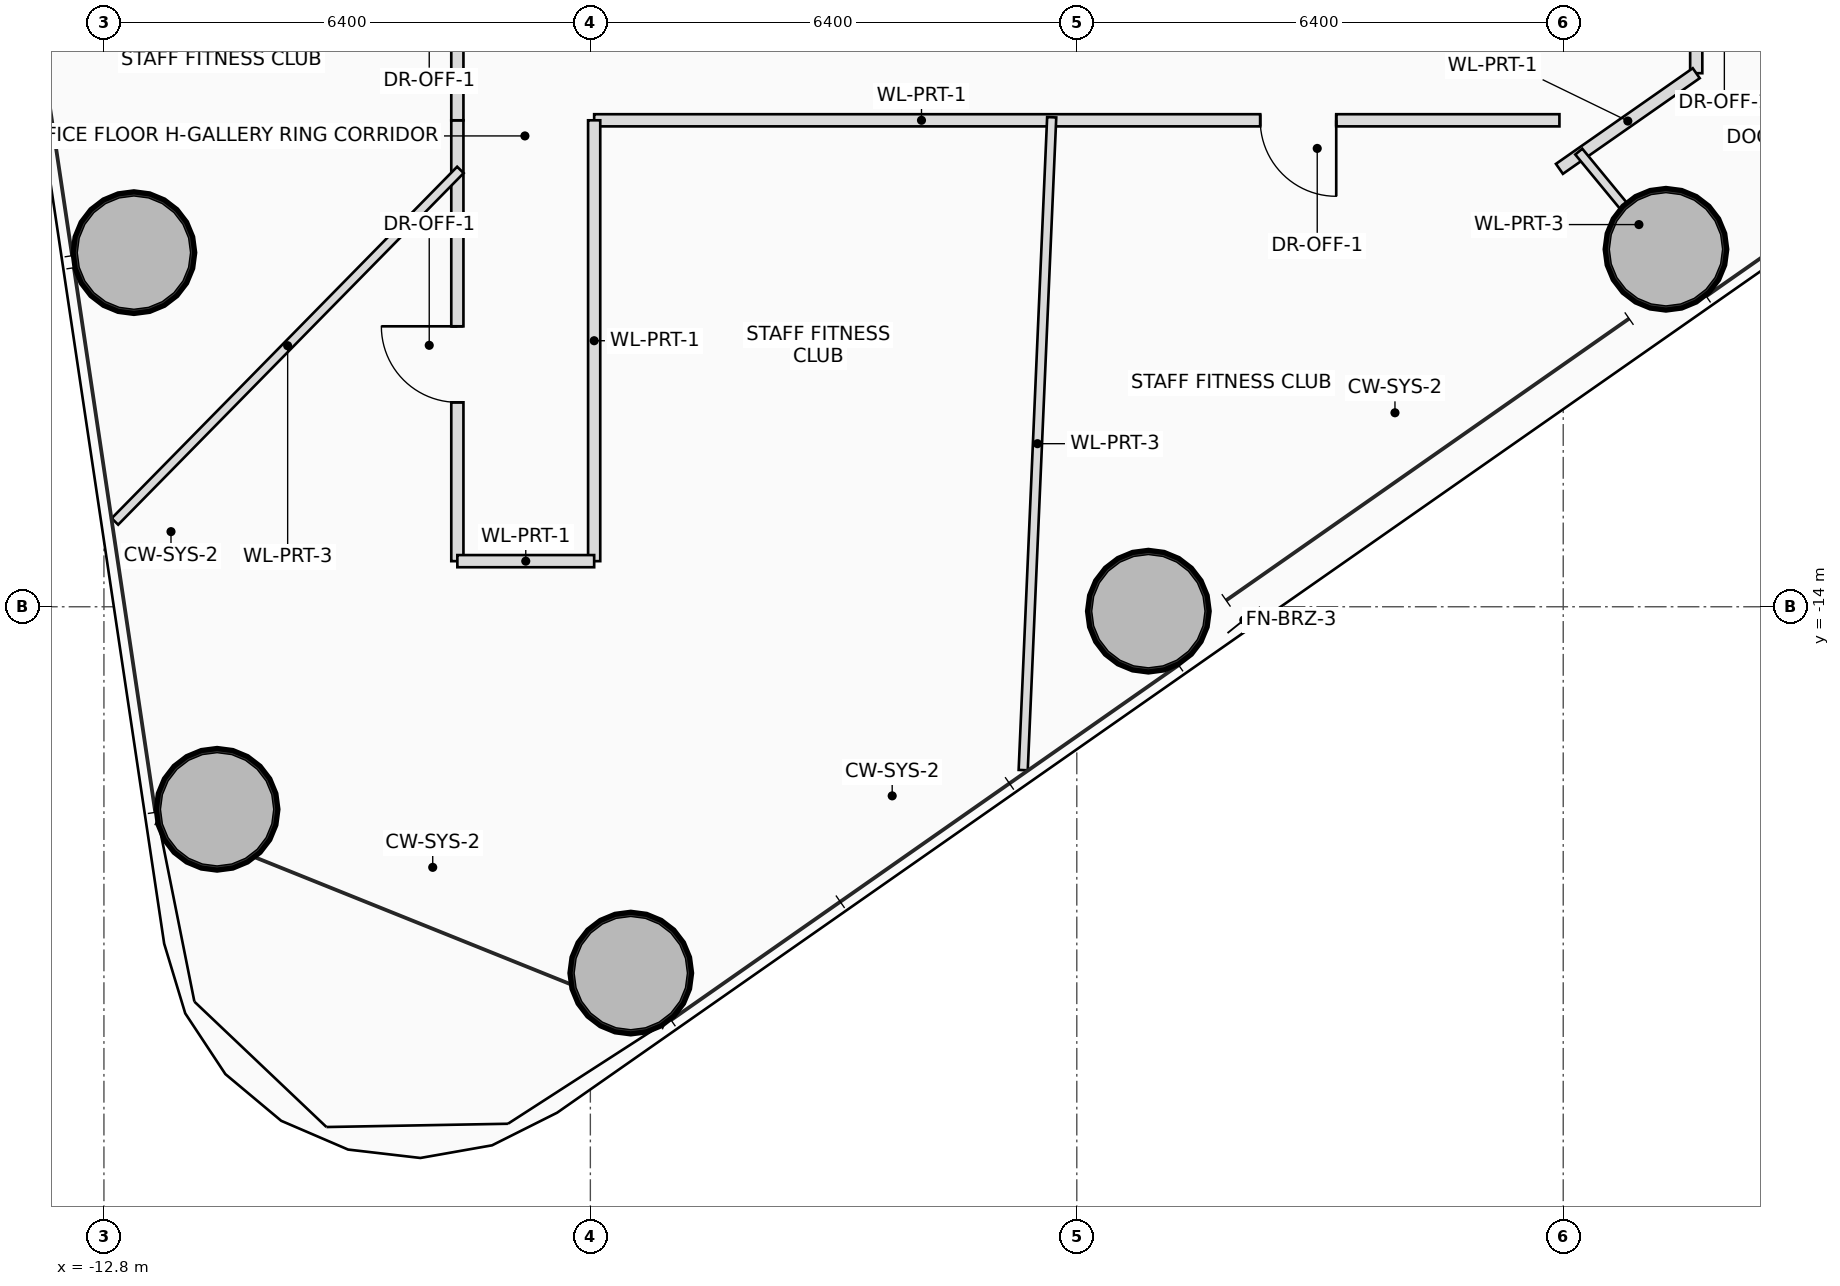
"""IFC4 building model, lengths in metres.
Left out: names, types, materials, properties, quantities, classifications, styles, units other than length and angle.
Written with IfcOpenShell. Run it as: python <this file> out.ifc"""

import sys

from ifc_helpers import new_model, si_unit, direction, frame, frame_2d, origin, origin_2d, place, context, subcontext, project, spatial, rectangle, hollow_circle, extrude, source, transform, mapped, element, fill, save


model = new_model("IFC4")
c1 = context("Model", 3, precision=1e-05, world=origin(), true_north=direction((0.0, 1.0)))
c2 = subcontext(c1, "Body", "Model", "MODEL_VIEW")
j1 = project(units=[si_unit("LENGTHUNIT", "METRE"), si_unit("PLANEANGLEUNIT", "RADIAN")], contexts=[c1])
p1 = place(None, origin())
s1 = spatial("IfcSite", under=j1, at=p1, CompositionType="ELEMENT")
p2 = place(p1, origin())
s2 = spatial("IfcBuilding", under=s1, at=p2, CompositionType="ELEMENT")
p3 = place(p2, frame((0.0, 0.0, 81.05)))
s3 = spatial("IfcBuildingStorey", under=s2, at=p3, CompositionType="ELEMENT", Elevation=81.05)
m1 = source(origin(), c2, "Body", "SweptSolid", [
    extrude(hollow_circle(Radius=0.8, WallThickness=0.055, at=origin_2d()), origin(), (0.0, 0.0, 1.0), 3.75),
])
for number, where, z_axis, x_axis in (
    (1, (-5.868, -18.819, 0.0), (0.0, 0.0, 1.0), (1.0, 0.0, 0.0)),
    (2, (0.942, -14.058, 0.0), (0.0, 0.0, 1.0), (1.0, 0.0, 0.0)),
    (3, (7.752, -9.297, 0.0), (0.0, 0.0, 1.0), (1.0, 0.0, 0.0)),
    (4, (-12.406, -9.341, 0.0), (0.0, 0.0, 1.0), (1.0, 0.0, 0.0)),
    (5, (-11.311, -16.665, 0.0), (0.0, 0.0, 1.0), (1.0, 0.0, 0.0)),
):
    element("IfcColumn", number, at=place(p3, frame(where, z_axis=z_axis, x_axis=x_axis)), inside=s3, PredefinedType="COLUMN", context=c2, shape_type="MappedRepresentation", body=[
        mapped(m1, transform((0.0, 0.0, 0.0), scale=1.0)),
    ])
p4 = place(p3, frame((-8.15, -13.4, 0.0), z_axis=(0.0, 0.0, 1.0), x_axis=(0.0, 1.0, 0.0)))
e6 = element("IfcWall", 6, at=p4, inside=s3, PredefinedType="PARTITIONING", context=c2, shape_type="SweptSolid", body=[
    extrude(rectangle(XDim=5.8, YDim=0.16, at=frame_2d((2.9, 0.0))), origin(), (0.0, 0.0, 1.0), 2.815),
])
p5 = place(p4, frame((2.09, 0.0, 0.0)))
e7 = element("IfcOpeningElement", 7, at=p5, cuts=e6, PredefinedType="OPENING", context=c2, shape_type="SweptSolid", body=[
    extrude(rectangle(XDim=1.0, YDim=2.25, at=frame_2d((0.5, 1.125))), frame((0.0, 0.09, 0.0), z_axis=(0.0, -1.0, 0.0), x_axis=(1.0, 0.0, 0.0)), (0.0, 0.0, 1.0), 0.18),
])
p6 = place(p3, frame((-8.15, -7.6, 0.0), z_axis=(0.0, 0.0, 1.0), x_axis=(0.0, 1.0, 0.0)))
e8 = element("IfcWall", 8, at=p6, inside=s3, PredefinedType="PARTITIONING", context=c2, shape_type="SweptSolid", body=[
    extrude(rectangle(XDim=15.2, YDim=0.16, at=frame_2d((7.6, 0.0))), origin(), (0.0, 0.0, 1.0), 2.815),
])
p7 = place(p6, frame((1.853, 0.0, 0.0)))
e9 = element("IfcOpeningElement", 9, at=p7, cuts=e8, PredefinedType="OPENING", context=c2, shape_type="SweptSolid", body=[
    extrude(rectangle(XDim=1.0, YDim=2.25, at=frame_2d((0.5, 1.125))), frame((0.0, 0.09, 0.0), z_axis=(0.0, -1.0, 0.0), x_axis=(1.0, 0.0, 0.0)), (0.0, 0.0, 1.0), 0.18),
])
p8 = place(p6, frame((7.613, 0.0, 0.0)))
e10 = element("IfcOpeningElement", 10, at=p8, cuts=e8, PredefinedType="OPENING", context=c2, shape_type="SweptSolid", body=[
    extrude(rectangle(XDim=1.0, YDim=2.25, at=frame_2d((0.5, 1.125))), frame((0.0, 0.09, 0.0), z_axis=(0.0, -1.0, 0.0), x_axis=(1.0, 0.0, 0.0)), (0.0, 0.0, 1.0), 0.18),
])
p9 = place(p6, frame((12.862, 0.0, 0.0)))
e11 = element("IfcOpeningElement", 11, at=p9, cuts=e8, PredefinedType="OPENING", context=c2, shape_type="SweptSolid", body=[
    extrude(rectangle(XDim=1.0, YDim=2.25, at=frame_2d((0.5, 1.125))), frame((0.0, 0.09, 0.0), z_axis=(0.0, -1.0, 0.0), x_axis=(1.0, 0.0, 0.0)), (0.0, 0.0, 1.0), 0.18),
])
p10 = place(p3, frame((8.15, -0.02, 0.0), z_axis=(0.0, 0.0, 1.0), x_axis=(0.0, -1.0, 0.0)))
e12 = element("IfcWall", 12, at=p10, inside=s3, PredefinedType="PARTITIONING", context=c2, shape_type="SweptSolid", body=[
    extrude(rectangle(XDim=6.96, YDim=0.16, at=frame_2d((3.48, 0.0))), origin(), (0.0, 0.0, 1.0), 2.815),
])
p11 = place(p10, frame((5.023, 0.0, 0.0)))
e13 = element("IfcOpeningElement", 13, at=p11, cuts=e12, PredefinedType="OPENING", context=c2, shape_type="SweptSolid", body=[
    extrude(rectangle(XDim=1.0, YDim=2.25, at=frame_2d((0.5, 1.125))), frame((0.0, 0.09, 0.0), z_axis=(0.0, -1.0, 0.0), x_axis=(1.0, 0.0, 0.0)), (0.0, 0.0, 1.0), 0.18),
])
p12 = place(p3, frame((8.15, -6.98, 0.0), z_axis=(0.0, 0.0, 1.0), x_axis=(-0.819513839239, -0.573059392468, 0.0)))
e14 = element("IfcWall", 14, at=p12, inside=s3, PredefinedType="PARTITIONING", context=c2, shape_type="SweptSolid", body=[
    extrude(rectangle(XDim=2.196, YDim=0.16, at=frame_2d((1.098, 0.0))), origin(), (0.0, 0.0, 1.0), 2.815),
])
p13 = place(p3, frame((6.35, -7.6, 0.0), z_axis=(0.0, 0.0, 1.0), x_axis=(-1.0, 0.0, 0.0)))
e15 = element("IfcWall", 15, at=p13, inside=s3, PredefinedType="PARTITIONING", context=c2, shape_type="SweptSolid", body=[
    extrude(rectangle(XDim=12.7, YDim=0.16, at=frame_2d((6.35, 0.0))), origin(), (0.0, 0.0, 1.0), 2.815),
])
p14 = place(p13, frame((2.937, 0.0, 0.0)))
e16 = element("IfcOpeningElement", 16, at=p14, cuts=e15, PredefinedType="OPENING", context=c2, shape_type="SweptSolid", body=[
    extrude(rectangle(XDim=1.0, YDim=2.25, at=frame_2d((0.5, 1.125))), frame((0.0, 0.09, 0.0), z_axis=(0.0, -1.0, 0.0), x_axis=(1.0, 0.0, 0.0)), (0.0, 0.0, 1.0), 0.18),
])
p15 = place(p3, frame((-6.35, -7.6, 0.0), z_axis=(0.0, 0.0, 1.0), x_axis=(0.0, -1.0, 0.0)))
e17 = element("IfcWall", 17, at=p15, inside=s3, PredefinedType="PARTITIONING", context=c2, shape_type="SweptSolid", body=[
    extrude(rectangle(XDim=5.8, YDim=0.16, at=frame_2d((2.9, 0.0))), origin(), (0.0, 0.0, 1.0), 3.015),
])
p16 = place(p3, frame((-6.35, -13.4, 0.0), z_axis=(0.0, 0.0, 1.0), x_axis=(-1.0, 0.0, 0.0)))
e18 = element("IfcWall", 18, at=p16, inside=s3, PredefinedType="PARTITIONING", context=c2, shape_type="SweptSolid", body=[
    extrude(rectangle(XDim=1.8, YDim=0.16, at=frame_2d((0.9, 0.0))), origin(), (0.0, 0.0, 1.0), 3.51),
])
p17 = place(p3, frame((-8.11, -8.253, 0.0), z_axis=(0.0, 0.0, 1.0), x_axis=(-0.700886951804, -0.713272374897, 0.0)))
e19 = element("IfcWall", 19, at=p17, inside=s3, PredefinedType="PARTITIONING", context=c2, shape_type="SweptSolid", body=[
    extrude(rectangle(XDim=6.485, YDim=0.12, at=frame_2d((3.243, 0.0))), origin(), (0.0, 0.0, 1.0), 2.975),
])
p18 = place(p3, frame((-0.33, -7.56, 0.0), z_axis=(0.0, 0.0, 1.0), x_axis=(-0.043619614926, -0.999048211646, 0.0)))
e20 = element("IfcWall", 20, at=p18, inside=s3, PredefinedType="PARTITIONING", context=c2, shape_type="SweptSolid", body=[
    extrude(rectangle(XDim=8.597, YDim=0.12, at=frame_2d((4.299, 0.0))), origin(), (0.0, 0.0, 1.0), 2.975),
])
p19 = place(p3, frame((6.605, -8.012, 0.0), z_axis=(0.0, 0.0, 1.0), x_axis=(0.636033986145, -0.771661045064, 0.0)))
e21 = element("IfcWall", 21, at=p19, inside=s3, PredefinedType="PARTITIONING", context=c2, shape_type="SweptSolid", body=[
    extrude(rectangle(XDim=2.488, YDim=0.12, at=frame_2d((1.244, 0.0))), origin(), (0.0, 0.0, 1.0), 3.51),
])
p20 = place(p3, frame((8.11, -4.222, 0.0), z_axis=(0.0, 0.0, 1.0), x_axis=(0.886984089822, -0.461799983112, 0.0)))
e22 = element("IfcWall", 22, at=p20, inside=s3, PredefinedType="PARTITIONING", context=c2, shape_type="SweptSolid", body=[
    extrude(rectangle(XDim=5.327, YDim=0.12, at=frame_2d((2.664, 0.0))), origin(), (0.0, 0.0, 1.0), 2.815),
])
p21 = place(p5, origin())
e23 = element("IfcDoor", 23, at=p21, inside=s3, OperationType="SINGLE_SWING_RIGHT", PredefinedType="DOOR", context=c2, shape_type="SweptSolid", body=[
    extrude(rectangle(XDim=1.0, YDim=2.25, at=frame_2d((0.5, 1.125))), frame((0.0, 0.025, 0.0), z_axis=(0.0, -1.0, 0.0), x_axis=(1.0, 0.0, 0.0)), (0.0, 0.0, 1.0), 0.05),
])
fill(e7, e23)
p22 = place(p14, origin())
e24 = element("IfcDoor", 24, at=p22, inside=s3, OperationType="SINGLE_SWING_LEFT", PredefinedType="DOOR", context=c2, shape_type="SweptSolid", body=[
    extrude(rectangle(XDim=1.0, YDim=2.25, at=frame_2d((0.5, 1.125))), frame((0.0, 0.025, 0.0), z_axis=(0.0, -1.0, 0.0), x_axis=(1.0, 0.0, 0.0)), (0.0, 0.0, 1.0), 0.05),
])
fill(e16, e24)
save(model, sys.argv[1])
